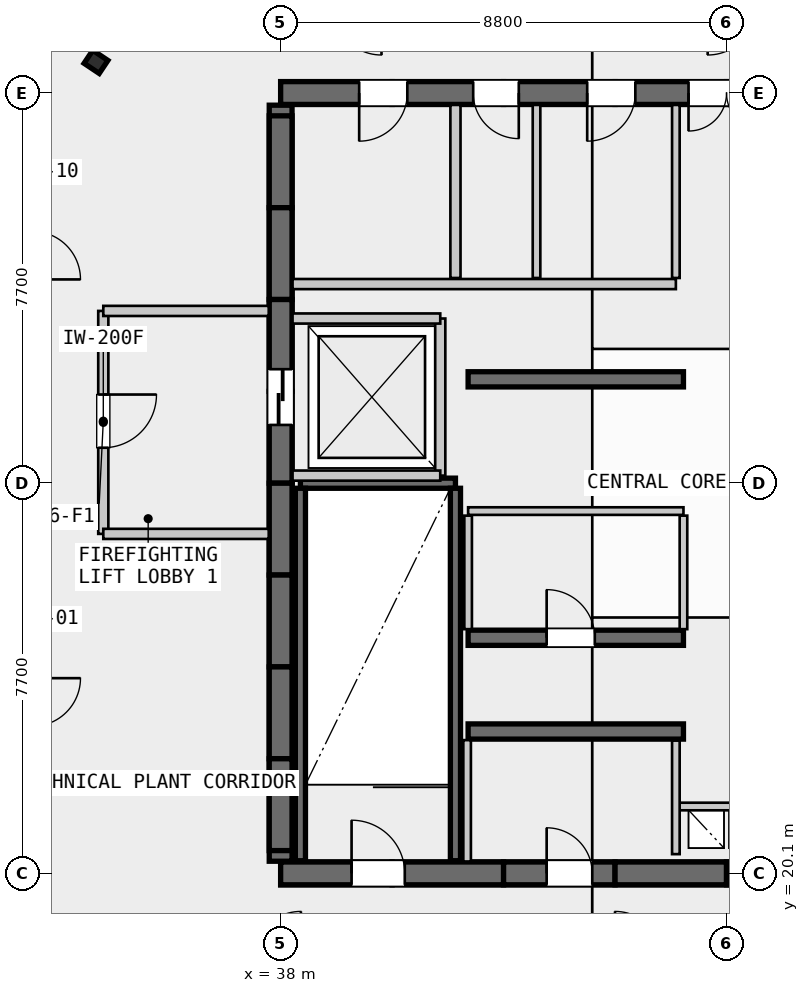
"""IFC4 building model, lengths in metres.
Left out: names, types, materials, properties, quantities, classifications, styles, units other than length and angle.
Written with IfcOpenShell. Run it as: python <this file> out.ifc"""

import sys

from ifc_helpers import new_model, si_unit, direction, frame, frame_2d, origin, origin_2d, place, context, subcontext, project, spatial, rectangle, i_section, extrude, source, transform, mapped, element, fill, save


model = new_model("IFC4")
c1 = context("Model", 3, precision=1e-05, world=origin(), true_north=direction((0.0, 1.0)))
c2 = subcontext(c1, "Body", "Model", "MODEL_VIEW")
j1 = project(units=[si_unit("LENGTHUNIT", "METRE"), si_unit("PLANEANGLEUNIT", "RADIAN")], contexts=[c1])
p1 = place(None, origin())
s1 = spatial("IfcSite", under=j1, at=p1, CompositionType="ELEMENT")
p2 = place(p1, origin())
s2 = spatial("IfcBuilding", under=s1, at=p2, CompositionType="ELEMENT")
p3 = place(p2, frame((0.0, 0.0, 324.3)))
s3 = spatial("IfcBuildingStorey", under=s2, at=p3, CompositionType="ELEMENT", Elevation=324.3)
p4 = place(p3, frame((38.0, 20.1, 0.0), z_axis=(0.0, 0.0, 1.0), x_axis=(1.0, 0.0, 0.0)))
e1 = element("IfcWall", 1, at=p4, inside=s3, PredefinedType="SHEAR", context=c2, shape_type="SweptSolid", body=[
    extrude(rectangle(XDim=17.6, YDim=0.45, at=frame_2d((8.8, 0.0))), origin(), (0.0, 0.0, 1.0), 4.2),
])
p5 = place(p4, frame((1.4, 0.0, 0.0)))
e2 = element("IfcOpeningElement", 2, at=p5, cuts=e1, PredefinedType="OPENING", context=c2, shape_type="SweptSolid", body=[
    extrude(rectangle(XDim=1.05, YDim=2.15, at=frame_2d((0.525, 1.075))), frame((0.0, 0.235, 0.0), z_axis=(0.0, -1.0, 0.0), x_axis=(1.0, 0.0, 0.0)), (0.0, 0.0, 1.0), 0.47),
])
p6 = place(p4, frame((15.15, 0.0, 0.0)))
e3 = element("IfcOpeningElement", 3, at=p6, cuts=e1, PredefinedType="OPENING", context=c2, shape_type="SweptSolid", body=[
    extrude(rectangle(XDim=1.05, YDim=2.15, at=frame_2d((0.525, 1.075))), frame((0.0, 0.235, 0.0), z_axis=(0.0, -1.0, 0.0), x_axis=(1.0, 0.0, 0.0)), (0.0, 0.0, 1.0), 0.47),
])
p7 = place(p4, frame((5.25, 0.0, 0.0)))
e4 = element("IfcOpeningElement", 4, at=p7, cuts=e1, PredefinedType="OPENING", context=c2, shape_type="SweptSolid", body=[
    extrude(rectangle(XDim=0.9, YDim=2.15, at=frame_2d((0.45, 1.075))), frame((0.0, 0.235, 0.0), z_axis=(0.0, -1.0, 0.0), x_axis=(1.0, 0.0, 0.0)), (0.0, 0.0, 1.0), 0.47),
])
p8 = place(p4, frame((11.4, 0.0, 0.0)))
e5 = element("IfcOpeningElement", 5, at=p8, cuts=e1, PredefinedType="OPENING", context=c2, shape_type="SweptSolid", body=[
    extrude(rectangle(XDim=0.95, YDim=2.15, at=frame_2d((0.475, 1.075))), frame((0.0, 0.235, 0.0), z_axis=(0.0, -1.0, 0.0), x_axis=(1.0, 0.0, 0.0)), (0.0, 0.0, 1.0), 0.47),
])
p9 = place(p3, frame((55.6, 35.5, 0.0), z_axis=(0.0, 0.0, 1.0), x_axis=(-1.0, 0.0, 0.0)))
e6 = element("IfcWall", 6, at=p9, inside=s3, PredefinedType="SHEAR", context=c2, shape_type="SweptSolid", body=[
    extrude(rectangle(XDim=17.6, YDim=0.45, at=frame_2d((8.8, 0.0))), origin(), (0.0, 0.0, 1.0), 4.2),
])
p10 = place(p9, frame((8.05, 0.0, 0.0)))
e7 = element("IfcOpeningElement", 7, at=p10, cuts=e6, PredefinedType="OPENING", context=c2, shape_type="SweptSolid", body=[
    extrude(rectangle(XDim=1.5, YDim=2.2, at=frame_2d((0.75, 1.1))), frame((0.0, 0.235, 0.0), z_axis=(0.0, -1.0, 0.0), x_axis=(1.0, 0.0, 0.0)), (0.0, 0.0, 1.0), 0.47),
])
p11 = place(p9, frame((15.1, 0.0, 0.0)))
e8 = element("IfcOpeningElement", 8, at=p11, cuts=e6, PredefinedType="OPENING", context=c2, shape_type="SweptSolid", body=[
    extrude(rectangle(XDim=0.95, YDim=2.15, at=frame_2d((0.475, 1.075))), frame((0.0, 0.235, 0.0), z_axis=(0.0, -1.0, 0.0), x_axis=(1.0, 0.0, 0.0)), (0.0, 0.0, 1.0), 0.47),
])
p12 = place(p9, frame((12.9, 0.0, 0.0)))
e9 = element("IfcOpeningElement", 9, at=p12, cuts=e6, PredefinedType="OPENING", context=c2, shape_type="SweptSolid", body=[
    extrude(rectangle(XDim=0.9, YDim=2.15, at=frame_2d((0.45, 1.075))), frame((0.0, 0.235, 0.0), z_axis=(0.0, -1.0, 0.0), x_axis=(1.0, 0.0, 0.0)), (0.0, 0.0, 1.0), 0.47),
])
p13 = place(p9, frame((10.6, 0.0, 0.0)))
e10 = element("IfcOpeningElement", 10, at=p13, cuts=e6, PredefinedType="OPENING", context=c2, shape_type="SweptSolid", body=[
    extrude(rectangle(XDim=0.95, YDim=2.15, at=frame_2d((0.475, 1.075))), frame((0.0, 0.235, 0.0), z_axis=(0.0, -1.0, 0.0), x_axis=(1.0, 0.0, 0.0)), (0.0, 0.0, 1.0), 0.47),
])
p14 = place(p3, frame((38.0, 35.26, 0.0), z_axis=(0.0, 0.0, 1.0), x_axis=(0.0, -1.0, 0.0)))
e11 = element("IfcWall", 11, at=p14, inside=s3, PredefinedType="SHEAR", context=c2, shape_type="SweptSolid", body=[
    extrude(rectangle(XDim=14.92, YDim=0.45, at=frame_2d((7.46, 0.0))), origin(), (0.0, 0.0, 1.0), 4.2),
])
p15 = place(p14, frame((5.21, 0.0, 0.0)))
e12 = element("IfcOpeningElement", 12, at=p15, cuts=e11, PredefinedType="OPENING", context=c2, shape_type="SweptSolid", body=[
    extrude(rectangle(XDim=1.1, YDim=2.2, at=frame_2d((0.55, 1.1))), frame((0.0, 0.235, 0.0), z_axis=(0.0, -1.0, 0.0), x_axis=(1.0, 0.0, 0.0)), (0.0, 0.0, 1.0), 0.47),
])
p16 = place(p3, frame((41.7, 22.9, 0.0), z_axis=(0.0, 0.0, 1.0), x_axis=(1.0, 0.0, 0.0)))
e13 = element("IfcWall", 13, at=p16, inside=s3, PredefinedType="SHEAR", context=c2, shape_type="SweptSolid", body=[
    extrude(rectangle(XDim=4.25, YDim=0.3, at=frame_2d((2.125, 0.0))), origin(), (0.0, 0.0, 1.0), 4.2),
])
p17 = place(p3, frame((41.7, 24.75, 0.0), z_axis=(0.0, 0.0, 1.0), x_axis=(1.0, 0.0, 0.0)))
e14 = element("IfcWall", 14, at=p17, inside=s3, PredefinedType="SHEAR", context=c2, shape_type="SweptSolid", body=[
    extrude(rectangle(XDim=4.25, YDim=0.3, at=frame_2d((2.125, 0.0))), origin(), (0.0, 0.0, 1.0), 4.2),
])
p18 = place(p17, frame((1.55, 0.0, 0.0)))
e15 = element("IfcOpeningElement", 15, at=p18, cuts=e14, PredefinedType="OPENING", context=c2, shape_type="SweptSolid", body=[
    extrude(rectangle(XDim=0.95, YDim=2.15, at=frame_2d((0.475, 1.075))), frame((0.0, 0.16, 0.0), z_axis=(0.0, -1.0, 0.0), x_axis=(1.0, 0.0, 0.0)), (0.0, 0.0, 1.0), 0.32),
])
p19 = place(p3, frame((41.7, 29.85, 0.0), z_axis=(0.0, 0.0, 1.0), x_axis=(1.0, 0.0, 0.0)))
e16 = element("IfcWall", 16, at=p19, inside=s3, PredefinedType="SHEAR", context=c2, shape_type="SweptSolid", body=[
    extrude(rectangle(XDim=4.25, YDim=0.3, at=frame_2d((2.125, 0.0))), origin(), (0.0, 0.0, 1.0), 4.2),
])
m1 = source(origin(), c2, "Body", "SweptSolid", [
    extrude(i_section(OverallWidth=0.309, OverallDepth=0.359, WebThickness=0.016, FlangeThickness=0.026, FilletRadius=0.027, at=origin_2d()), origin(), (0.0, 0.0, 1.0), 8.552),
])
p20 = place(p3, frame((34.356, 36.115, 0.0), z_axis=(0.0, 0.0, 1.0), x_axis=(-0.831469612303, 0.55557023302, 0.0)))
e17 = element("IfcColumn", 17, at=p20, inside=s3, PredefinedType="COLUMN", context=c2, shape_type="MappedRepresentation", body=[
    mapped(m1, transform((0.0, 0.0, 0.0), scale=1.0)),
])
p21 = place(p3, frame((38.0, 20.1, 4.2), z_axis=(0.0, 0.0, 1.0), x_axis=(1.0, 0.0, 0.0)))
e18 = element("IfcWall", 18, at=p21, inside=s3, PredefinedType="SHEAR", context=c2, shape_type="SweptSolid", body=[
    extrude(rectangle(XDim=2.2, YDim=0.45, at=frame_2d((1.1, 0.0))), origin(), (0.0, 0.0, 1.0), 1.752),
])
p22 = place(p3, frame((40.2, 20.1, 4.2), z_axis=(0.0, 0.0, 1.0), x_axis=(1.0, 0.0, 0.0)))
e19 = element("IfcWall", 19, at=p22, inside=s3, PredefinedType="SHEAR", context=c2, shape_type="SweptSolid", body=[
    extrude(rectangle(XDim=2.2, YDim=0.45, at=frame_2d((1.1, 0.0))), origin(), (0.0, 0.0, 1.0), 1.878),
])
p23 = place(p3, frame((42.4, 20.1, 4.2), z_axis=(0.0, 0.0, 1.0), x_axis=(1.0, 0.0, 0.0)))
e20 = element("IfcWall", 20, at=p23, inside=s3, PredefinedType="SHEAR", context=c2, shape_type="SweptSolid", body=[
    extrude(rectangle(XDim=2.2, YDim=0.45, at=frame_2d((1.1, 0.0))), origin(), (0.0, 0.0, 1.0), 2.004),
])
p24 = place(p3, frame((44.6, 20.1, 4.2), z_axis=(0.0, 0.0, 1.0), x_axis=(1.0, 0.0, 0.0)))
e21 = element("IfcWall", 21, at=p24, inside=s3, PredefinedType="SHEAR", context=c2, shape_type="SweptSolid", body=[
    extrude(rectangle(XDim=2.2, YDim=0.45, at=frame_2d((1.1, 0.0))), origin(), (0.0, 0.0, 1.0), 2.129),
])
p25 = place(p3, frame((46.8, 20.1, 4.2), z_axis=(0.0, 0.0, 1.0), x_axis=(1.0, 0.0, 0.0)))
e22 = element("IfcWall", 22, at=p25, inside=s3, PredefinedType="SHEAR", context=c2, shape_type="SweptSolid", body=[
    extrude(rectangle(XDim=2.2, YDim=0.45, at=frame_2d((1.1, 0.0))), origin(), (0.0, 0.0, 1.0), 2.255),
])
p26 = place(p3, frame((49.0, 35.5, 4.2), z_axis=(0.0, 0.0, 1.0), x_axis=(-1.0, 0.0, 0.0)))
e23 = element("IfcWall", 23, at=p26, inside=s3, PredefinedType="SHEAR", context=c2, shape_type="SweptSolid", body=[
    extrude(rectangle(XDim=2.2, YDim=0.45, at=frame_2d((1.1, 0.0))), origin(), (0.0, 0.0, 1.0), 4.965),
])
p27 = place(p3, frame((46.8, 35.5, 4.2), z_axis=(0.0, 0.0, 1.0), x_axis=(-1.0, 0.0, 0.0)))
e24 = element("IfcWall", 24, at=p27, inside=s3, PredefinedType="SHEAR", context=c2, shape_type="SweptSolid", body=[
    extrude(rectangle(XDim=2.2, YDim=0.45, at=frame_2d((1.1, 0.0))), origin(), (0.0, 0.0, 1.0), 4.839),
])
p28 = place(p3, frame((44.6, 35.5, 4.2), z_axis=(0.0, 0.0, 1.0), x_axis=(-1.0, 0.0, 0.0)))
e25 = element("IfcWall", 25, at=p28, inside=s3, PredefinedType="SHEAR", context=c2, shape_type="SweptSolid", body=[
    extrude(rectangle(XDim=2.2, YDim=0.45, at=frame_2d((1.1, 0.0))), origin(), (0.0, 0.0, 1.0), 4.713),
])
p29 = place(p3, frame((42.4, 35.5, 4.2), z_axis=(0.0, 0.0, 1.0), x_axis=(-1.0, 0.0, 0.0)))
e26 = element("IfcWall", 26, at=p29, inside=s3, PredefinedType="SHEAR", context=c2, shape_type="SweptSolid", body=[
    extrude(rectangle(XDim=2.2, YDim=0.45, at=frame_2d((1.1, 0.0))), origin(), (0.0, 0.0, 1.0), 4.587),
])
p30 = place(p3, frame((40.2, 35.5, 4.2), z_axis=(0.0, 0.0, 1.0), x_axis=(-1.0, 0.0, 0.0)))
e27 = element("IfcWall", 27, at=p30, inside=s3, PredefinedType="SHEAR", context=c2, shape_type="SweptSolid", body=[
    extrude(rectangle(XDim=2.2, YDim=0.45, at=frame_2d((1.1, 0.0))), origin(), (0.0, 0.0, 1.0), 4.462),
])
p31 = place(p3, frame((38.0, 35.05, 4.2), z_axis=(0.0, 0.0, 1.0), x_axis=(0.0, -1.0, 0.0)))
e28 = element("IfcWall", 28, at=p31, inside=s3, PredefinedType="SHEAR", context=c2, shape_type="SweptSolid", body=[
    extrude(rectangle(XDim=1.812, YDim=0.45, at=frame_2d((0.906, 0.0))), origin(), (0.0, 0.0, 1.0), 4.064),
])
p32 = place(p3, frame((38.0, 33.238, 4.2), z_axis=(0.0, 0.0, 1.0), x_axis=(0.0, -1.0, 0.0)))
e29 = element("IfcWall", 29, at=p32, inside=s3, PredefinedType="SHEAR", context=c2, shape_type="SweptSolid", body=[
    extrude(rectangle(XDim=1.812, YDim=0.45, at=frame_2d((0.906, 0.0))), origin(), (0.0, 0.0, 1.0), 3.745),
])
p33 = place(p3, frame((38.0, 31.425, 4.2), z_axis=(0.0, 0.0, 1.0), x_axis=(0.0, -1.0, 0.0)))
e30 = element("IfcWall", 30, at=p33, inside=s3, PredefinedType="SHEAR", context=c2, shape_type="SweptSolid", body=[
    extrude(rectangle(XDim=1.812, YDim=0.45, at=frame_2d((0.906, 0.0))), origin(), (0.0, 0.0, 1.0), 3.426),
])
p34 = place(p3, frame((38.0, 29.613, 4.2), z_axis=(0.0, 0.0, 1.0), x_axis=(0.0, -1.0, 0.0)))
e31 = element("IfcWall", 31, at=p34, inside=s3, PredefinedType="SHEAR", context=c2, shape_type="SweptSolid", body=[
    extrude(rectangle(XDim=1.812, YDim=0.45, at=frame_2d((0.906, 0.0))), origin(), (0.0, 0.0, 1.0), 3.107),
])
p35 = place(p3, frame((38.0, 27.8, 4.2), z_axis=(0.0, 0.0, 1.0), x_axis=(0.0, -1.0, 0.0)))
e32 = element("IfcWall", 32, at=p35, inside=s3, PredefinedType="SHEAR", context=c2, shape_type="SweptSolid", body=[
    extrude(rectangle(XDim=1.812, YDim=0.45, at=frame_2d((0.906, 0.0))), origin(), (0.0, 0.0, 1.0), 2.788),
])
p36 = place(p3, frame((38.0, 25.988, 4.2), z_axis=(0.0, 0.0, 1.0), x_axis=(0.0, -1.0, 0.0)))
e33 = element("IfcWall", 33, at=p36, inside=s3, PredefinedType="SHEAR", context=c2, shape_type="SweptSolid", body=[
    extrude(rectangle(XDim=1.812, YDim=0.45, at=frame_2d((0.906, 0.0))), origin(), (0.0, 0.0, 1.0), 2.469),
])
p37 = place(p3, frame((38.0, 24.175, 4.2), z_axis=(0.0, 0.0, 1.0), x_axis=(0.0, -1.0, 0.0)))
e34 = element("IfcWall", 34, at=p37, inside=s3, PredefinedType="SHEAR", context=c2, shape_type="SweptSolid", body=[
    extrude(rectangle(XDim=1.812, YDim=0.45, at=frame_2d((0.906, 0.0))), origin(), (0.0, 0.0, 1.0), 2.15),
])
p38 = place(p3, frame((38.0, 22.363, 4.2), z_axis=(0.0, 0.0, 1.0), x_axis=(0.0, -1.0, 0.0)))
e35 = element("IfcWall", 35, at=p38, inside=s3, PredefinedType="SHEAR", context=c2, shape_type="SweptSolid", body=[
    extrude(rectangle(XDim=1.812, YDim=0.45, at=frame_2d((0.906, 0.0))), origin(), (0.0, 0.0, 1.0), 1.831),
])
p39 = place(p3, frame((34.065, 39.551, 8.48), z_axis=(0.0, 0.0, 1.0), x_axis=(-0.496977942781, -0.867763172985, 0.0)))
e36 = element("IfcWall", 36, at=p39, inside=s3, PredefinedType="PARAPET", context=c2, shape_type="SweptSolid", body=[
    extrude(rectangle(XDim=3.728, YDim=0.25, at=frame_2d((1.864, 0.0))), origin(), (0.0, 0.0, 1.0), 0.357),
])
p40 = place(p3, frame((38.39, 27.8, 0.0), z_axis=(0.0, 0.0, 1.0), x_axis=(1.0, 0.0, 0.0)))
e37 = element("IfcWall", 37, at=p40, inside=s3, PredefinedType="SHEAR", context=c2, shape_type="SweptSolid", body=[
    extrude(rectangle(XDim=3.06, YDim=0.2, at=frame_2d((1.53, 0.0))), origin(), (0.0, 0.0, 1.0), 4.2),
])
for number, where, z_axis, x_axis in (
    (38, (41.45, 27.7, 0.0), (0.0, 0.0, 1.0), (0.0, -1.0, 0.0)),
    (39, (38.39, 20.35, 0.0), (0.0, 0.0, 1.0), (0.0, 1.0, 0.0)),
):
    element("IfcWall", number, at=place(p3, frame(where, z_axis=z_axis, x_axis=x_axis)), inside=s3, PredefinedType="SHEAR", context=c2, shape_type="SweptSolid", body=[
        extrude(rectangle(XDim=7.35, YDim=0.2, at=frame_2d((3.675, 0.0))), origin(), (0.0, 0.0, 1.0), 4.2),
    ])
p41 = place(p3, frame((45.8, 21.42, 0.0), z_axis=(0.0, 0.0, 1.0), x_axis=(1.0, 0.0, 0.0)))
e40 = element("IfcWall", 40, at=p41, inside=s3, PredefinedType="PARTITIONING", context=c2, shape_type="SweptSolid", body=[
    extrude(rectangle(XDim=2.0, YDim=0.15, at=frame_2d((1.0, 0.0))), origin(), (0.0, 0.0, 1.0), 3.49),
])
p42 = place(p3, frame((45.8, 20.48, 0.0), z_axis=(0.0, 0.0, 1.0), x_axis=(0.0, 1.0, 0.0)))
e41 = element("IfcWall", 41, at=p42, inside=s3, PredefinedType="PARTITIONING", context=c2, shape_type="SweptSolid", body=[
    extrude(rectangle(XDim=2.24, YDim=0.15, at=frame_2d((1.12, 0.0))), origin(), (0.0, 0.0, 1.0), 3.49),
])
p43 = place(p3, frame((41.15, 27.95, 0.0), z_axis=(0.0, 0.0, 1.0), x_axis=(0.0, 1.0, 0.0)))
e42 = element("IfcWall", 42, at=p43, inside=s3, PredefinedType="PARTITIONING", context=c2, shape_type="SweptSolid", body=[
    extrude(rectangle(XDim=3.1, YDim=0.2, at=frame_2d((1.55, 0.0))), origin(), (0.0, 0.0, 1.0), 2.76),
])
for number, where, z_axis, x_axis in (
    (43, (38.235, 27.95, 0.0), (0.0, 0.0, 1.0), (1.0, 0.0, 0.0)),
    (44, (38.235, 31.05, 0.0), (0.0, 0.0, 1.0), (1.0, 0.0, 0.0)),
):
    element("IfcWall", number, at=place(p3, frame(where, z_axis=z_axis, x_axis=x_axis)), inside=s3, PredefinedType="PARTITIONING", context=c2, shape_type="SweptSolid", body=[
        extrude(rectangle(XDim=2.915, YDim=0.2, at=frame_2d((1.458, 0.0))), origin(), (0.0, 0.0, 1.0), 3.49),
    ])
p44 = place(p3, frame((34.5, 31.2, 0.0), z_axis=(0.0, 0.0, 1.0), x_axis=(0.0, -1.0, 0.0)))
e45 = element("IfcWall", 45, at=p44, inside=s3, PredefinedType="PARTITIONING", context=c2, shape_type="SweptSolid", body=[
    extrude(rectangle(XDim=4.4, YDim=0.2, at=frame_2d((2.2, 0.0))), origin(), (0.0, 0.0, 1.0), 3.49),
])
p45 = place(p44, frame((1.65, 0.0, 0.0)))
e46 = element("IfcOpeningElement", 46, at=p45, cuts=e45, PredefinedType="OPENING", context=c2, shape_type="SweptSolid", body=[
    extrude(rectangle(XDim=1.05, YDim=2.15, at=frame_2d((0.525, 1.075))), frame((0.0, 0.11, 0.0), z_axis=(0.0, -1.0, 0.0), x_axis=(1.0, 0.0, 0.0)), (0.0, 0.0, 1.0), 0.22),
])
for number, where, z_axis, x_axis in (
    (47, (34.5, 26.8, 0.0), (0.0, 0.0, 1.0), (1.0, 0.0, 0.0)),
    (48, (34.5, 31.2, 0.0), (0.0, 0.0, 1.0), (1.0, 0.0, 0.0)),
):
    element("IfcWall", number, at=place(p3, frame(where, z_axis=z_axis, x_axis=x_axis)), inside=s3, PredefinedType="PARTITIONING", context=c2, shape_type="SweptSolid", body=[
        extrude(rectangle(XDim=3.265, YDim=0.2, at=frame_2d((1.632, 0.0))), origin(), (0.0, 0.0, 1.0), 3.49),
    ])
p46 = place(p3, frame((41.68, 20.335, 0.0), z_axis=(0.0, 0.0, 1.0), x_axis=(0.0, 1.0, 0.0)))
e49 = element("IfcWall", 49, at=p46, inside=s3, PredefinedType="PARTITIONING", context=c2, shape_type="SweptSolid", body=[
    extrude(rectangle(XDim=2.395, YDim=0.15, at=frame_2d((1.198, 0.0))), origin(), (0.0, 0.0, 1.0), 3.49),
])
p47 = place(p3, frame((41.7, 27.25, 0.0), z_axis=(0.0, 0.0, 1.0), x_axis=(1.0, 0.0, 0.0)))
e50 = element("IfcWall", 50, at=p47, inside=s3, PredefinedType="PARTITIONING", context=c2, shape_type="SweptSolid", body=[
    extrude(rectangle(XDim=4.25, YDim=0.15, at=frame_2d((2.125, 0.0))), origin(), (0.0, 0.0, 1.0), 2.76),
])
for number, where, z_axis, x_axis in (
    (51, (41.7, 24.92, 0.0), (0.0, 0.0, 1.0), (0.0, 1.0, 0.0)),
    (52, (45.95, 24.92, 0.0), (0.0, 0.0, 1.0), (0.0, 1.0, 0.0)),
):
    element("IfcWall", number, at=place(p3, frame(where, z_axis=z_axis, x_axis=x_axis)), inside=s3, PredefinedType="PARTITIONING", context=c2, shape_type="SweptSolid", body=[
        extrude(rectangle(XDim=2.24, YDim=0.15, at=frame_2d((1.12, 0.0))), origin(), (0.0, 0.0, 1.0), 2.76),
    ])
p48 = place(p3, frame((41.45, 31.85, 0.0), z_axis=(0.0, 0.0, 1.0), x_axis=(0.0, 1.0, 0.0)))
e53 = element("IfcWall", 53, at=p48, inside=s3, PredefinedType="PARTITIONING", context=c2, shape_type="SweptSolid", body=[
    extrude(rectangle(XDim=3.415, YDim=0.2, at=frame_2d((1.708, 0.0))), origin(), (0.0, 0.0, 1.0), 3.49),
])
p49 = place(p3, frame((38.235, 31.73, 0.0), z_axis=(0.0, 0.0, 1.0), x_axis=(1.0, 0.0, 0.0)))
e54 = element("IfcWall", 54, at=p49, inside=s3, PredefinedType="PARTITIONING", context=c2, shape_type="SweptSolid", body=[
    extrude(rectangle(XDim=7.565, YDim=0.2, at=frame_2d((3.782, 0.0))), origin(), (0.0, 0.0, 1.0), 2.76),
])
p50 = place(p3, frame((45.8, 31.85, 0.0), z_axis=(0.0, 0.0, 1.0), x_axis=(0.0, 1.0, 0.0)))
e55 = element("IfcWall", 55, at=p50, inside=s3, PredefinedType="PARTITIONING", context=c2, shape_type="SweptSolid", body=[
    extrude(rectangle(XDim=3.415, YDim=0.15, at=frame_2d((1.708, 0.0))), origin(), (0.0, 0.0, 1.0), 3.49),
])
p51 = place(p3, frame((43.05, 31.85, 0.0), z_axis=(0.0, 0.0, 1.0), x_axis=(0.0, 1.0, 0.0)))
e56 = element("IfcWall", 56, at=p51, inside=s3, PredefinedType="PLUMBINGWALL", context=c2, shape_type="SweptSolid", body=[
    extrude(rectangle(XDim=3.415, YDim=0.15, at=frame_2d((1.708, 0.0))), origin(), (0.0, 0.0, 1.0), 3.49),
])
m2 = source(origin(), c2, "Body", "SweptSolid", [
    extrude(rectangle(XDim=1.05, YDim=2.15, at=frame_2d((0.525, 1.075))), frame((0.0, 0.025, 0.0), z_axis=(0.0, -1.0, 0.0), x_axis=(1.0, 0.0, 0.0)), (0.0, 0.0, 1.0), 0.05),
])
p52 = place(p5, origin())
e57 = element("IfcDoor", 57, at=p52, inside=s3, OperationType="SINGLE_SWING_LEFT", PredefinedType="DOOR", context=c2, shape_type="MappedRepresentation", body=[
    mapped(m2, transform((0.0, 0.0, 0.0), scale=1.0)),
])
fill(e2, e57)
m3 = source(origin(), c2, "Body", "SweptSolid", [
    extrude(rectangle(XDim=1.5, YDim=2.2, at=frame_2d((0.75, 1.1))), frame((0.0, 0.025, 0.0), z_axis=(0.0, -1.0, 0.0), x_axis=(1.0, 0.0, 0.0)), (0.0, 0.0, 1.0), 0.05),
])
p53 = place(p10, origin())
e58 = element("IfcDoor", 58, at=p53, inside=s3, OperationType="DOUBLE_DOOR_SINGLE_SWING", PredefinedType="DOOR", context=c2, shape_type="MappedRepresentation", body=[
    mapped(m3, transform((0.0, 0.0, 0.0), scale=1.0)),
])
fill(e7, e58)
m4 = source(origin(), c2, "Body", "SweptSolid", [
    extrude(rectangle(XDim=1.1, YDim=2.2, at=frame_2d((0.55, 1.1))), frame((0.0, 0.025, 0.0), z_axis=(0.0, -1.0, 0.0), x_axis=(1.0, 0.0, 0.0)), (0.0, 0.0, 1.0), 0.05),
])
p54 = place(p15, origin())
e59 = element("IfcDoor", 59, at=p54, inside=s3, OperationType="SLIDING_TO_LEFT", PredefinedType="DOOR", context=c2, shape_type="MappedRepresentation", body=[
    mapped(m4, transform((0.0, 0.0, 0.0), scale=1.0)),
])
fill(e12, e59)
m5 = source(origin(), c2, "Body", "SweptSolid", [
    extrude(rectangle(XDim=0.9, YDim=2.15, at=frame_2d((0.45, 1.075))), frame((0.0, 0.025, 0.0), z_axis=(0.0, -1.0, 0.0), x_axis=(1.0, 0.0, 0.0)), (0.0, 0.0, 1.0), 0.05),
])
p55 = place(p7, origin())
e60 = element("IfcDoor", 60, at=p55, inside=s3, OperationType="SINGLE_SWING_LEFT", PredefinedType="DOOR", context=c2, shape_type="MappedRepresentation", body=[
    mapped(m5, transform((0.0, 0.0, 0.0), scale=1.0)),
])
fill(e4, e60)
m6 = source(origin(), c2, "Body", "SweptSolid", [
    extrude(rectangle(XDim=0.95, YDim=2.15, at=frame_2d((0.475, 1.075))), frame((0.0, 0.025, 0.0), z_axis=(0.0, -1.0, 0.0), x_axis=(1.0, 0.0, 0.0)), (0.0, 0.0, 1.0), 0.05),
])
p56 = place(p18, origin())
e61 = element("IfcDoor", 61, at=p56, inside=s3, OperationType="SINGLE_SWING_LEFT", PredefinedType="DOOR", context=c2, shape_type="MappedRepresentation", body=[
    mapped(m6, transform((0.0, 0.0, 0.0), scale=1.0)),
])
fill(e15, e61)
p57 = place(p11, origin())
e62 = element("IfcDoor", 62, at=p57, inside=s3, OperationType="SINGLE_SWING_RIGHT", PredefinedType="DOOR", context=c2, shape_type="MappedRepresentation", body=[
    mapped(m6, transform((0.0, 0.0, 0.0), scale=1.0)),
])
fill(e8, e62)
p58 = place(p12, origin())
e63 = element("IfcDoor", 63, at=p58, inside=s3, OperationType="SINGLE_SWING_LEFT", PredefinedType="DOOR", context=c2, shape_type="MappedRepresentation", body=[
    mapped(m5, transform((0.0, 0.0, 0.0), scale=1.0)),
])
fill(e9, e63)
p59 = place(p13, origin())
e64 = element("IfcDoor", 64, at=p59, inside=s3, OperationType="SINGLE_SWING_RIGHT", PredefinedType="DOOR", context=c2, shape_type="MappedRepresentation", body=[
    mapped(m6, transform((0.0, 0.0, 0.0), scale=1.0)),
])
fill(e10, e64)
p60 = place(p45, origin())
e65 = element("IfcDoor", 65, at=p60, inside=s3, OperationType="SINGLE_SWING_LEFT", PredefinedType="DOOR", context=c2, shape_type="MappedRepresentation", body=[
    mapped(m2, transform((0.0, 0.0, 0.0), scale=1.0)),
])
fill(e46, e65)
save(model, sys.argv[1])
